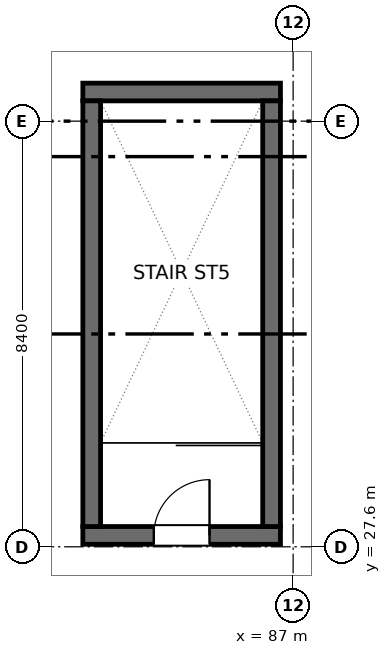
"""IFC4 building model, lengths in metres.
Left out: names, types, materials, properties, quantities, classifications, styles, units other than length and angle.
Written with IfcOpenShell. Run it as: python <this file> out.ifc"""

import sys

from ifc_helpers import new_model, si_unit, direction, frame, frame_2d, origin, place, context, subcontext, project, spatial, rectangle, extrude, element, fill, save


model = new_model("IFC4")
c1 = context("Model", 3, precision=1e-05, world=origin(), true_north=direction((0.0, 1.0)))
c2 = subcontext(c1, "Body", "Model", "MODEL_VIEW")
j1 = project(units=[si_unit("LENGTHUNIT", "METRE"), si_unit("PLANEANGLEUNIT", "RADIAN")], contexts=[c1])
p1 = place(None, origin())
s1 = spatial("IfcSite", under=j1, at=p1, CompositionType="ELEMENT")
p2 = place(p1, origin())
s2 = spatial("IfcBuilding", under=s1, at=p2, CompositionType="ELEMENT")
p3 = place(p2, frame((0.0, 0.0, 17.1)))
s3 = spatial("IfcBuildingStorey", under=s2, at=p3, CompositionType="ELEMENT", Elevation=17.1)
p4 = place(p3, frame((82.85, 27.825, 0.0), z_axis=(0.0, 0.0, 1.0), x_axis=(1.0, 0.0, 0.0)))
e1 = element("IfcWall", 1, at=p4, inside=s3, PredefinedType="SHEAR", context=c2, shape_type="SweptSolid", body=[
    extrude(rectangle(XDim=3.9, YDim=0.35, at=frame_2d((1.95, 0.0))), origin(), (0.0, 0.0, 1.0), 4.5),
])
p5 = place(p4, frame((1.4, 0.0, 0.0)))
e2 = element("IfcOpeningElement", 2, at=p5, cuts=e1, PredefinedType="OPENING", context=c2, shape_type="SweptSolid", body=[
    extrude(rectangle(XDim=1.1, YDim=2.05, at=frame_2d((0.55, 1.025))), frame((0.0, 0.185, 0.0), z_axis=(0.0, -1.0, 0.0), x_axis=(1.0, 0.0, 0.0)), (0.0, 0.0, 1.0), 0.37),
])
p6 = place(p3, frame((82.85, 36.575, 0.0), z_axis=(0.0, 0.0, 1.0), x_axis=(1.0, 0.0, 0.0)))
e3 = element("IfcWall", 3, at=p6, inside=s3, PredefinedType="SHEAR", context=c2, shape_type="SweptSolid", body=[
    extrude(rectangle(XDim=3.9, YDim=0.35, at=frame_2d((1.95, 0.0))), origin(), (0.0, 0.0, 1.0), 4.5),
])
for number, where, z_axis, x_axis in (
    (4, (83.025, 28.0, 0.0), (0.0, 0.0, 1.0), (0.0, 1.0, 0.0)),
    (5, (86.575, 28.0, 0.0), (0.0, 0.0, 1.0), (0.0, 1.0, 0.0)),
):
    element("IfcWall", number, at=place(p3, frame(where, z_axis=z_axis, x_axis=x_axis)), inside=s3, PredefinedType="SHEAR", context=c2, shape_type="SweptSolid", body=[
        extrude(rectangle(XDim=8.4, YDim=0.35, at=frame_2d((4.2, 0.0))), origin(), (0.0, 0.0, 1.0), 4.5),
    ])
p7 = place(p5, origin())
e6 = element("IfcDoor", 6, at=p7, inside=s3, OperationType="SINGLE_SWING_RIGHT", PredefinedType="DOOR", context=c2, shape_type="SweptSolid", body=[
    extrude(rectangle(XDim=1.1, YDim=2.05, at=frame_2d((0.55, 1.025))), frame((0.0, 0.025, 0.0), z_axis=(0.0, -1.0, 0.0), x_axis=(1.0, 0.0, 0.0)), (0.0, 0.0, 1.0), 0.05),
])
fill(e2, e6)
save(model, sys.argv[1])
